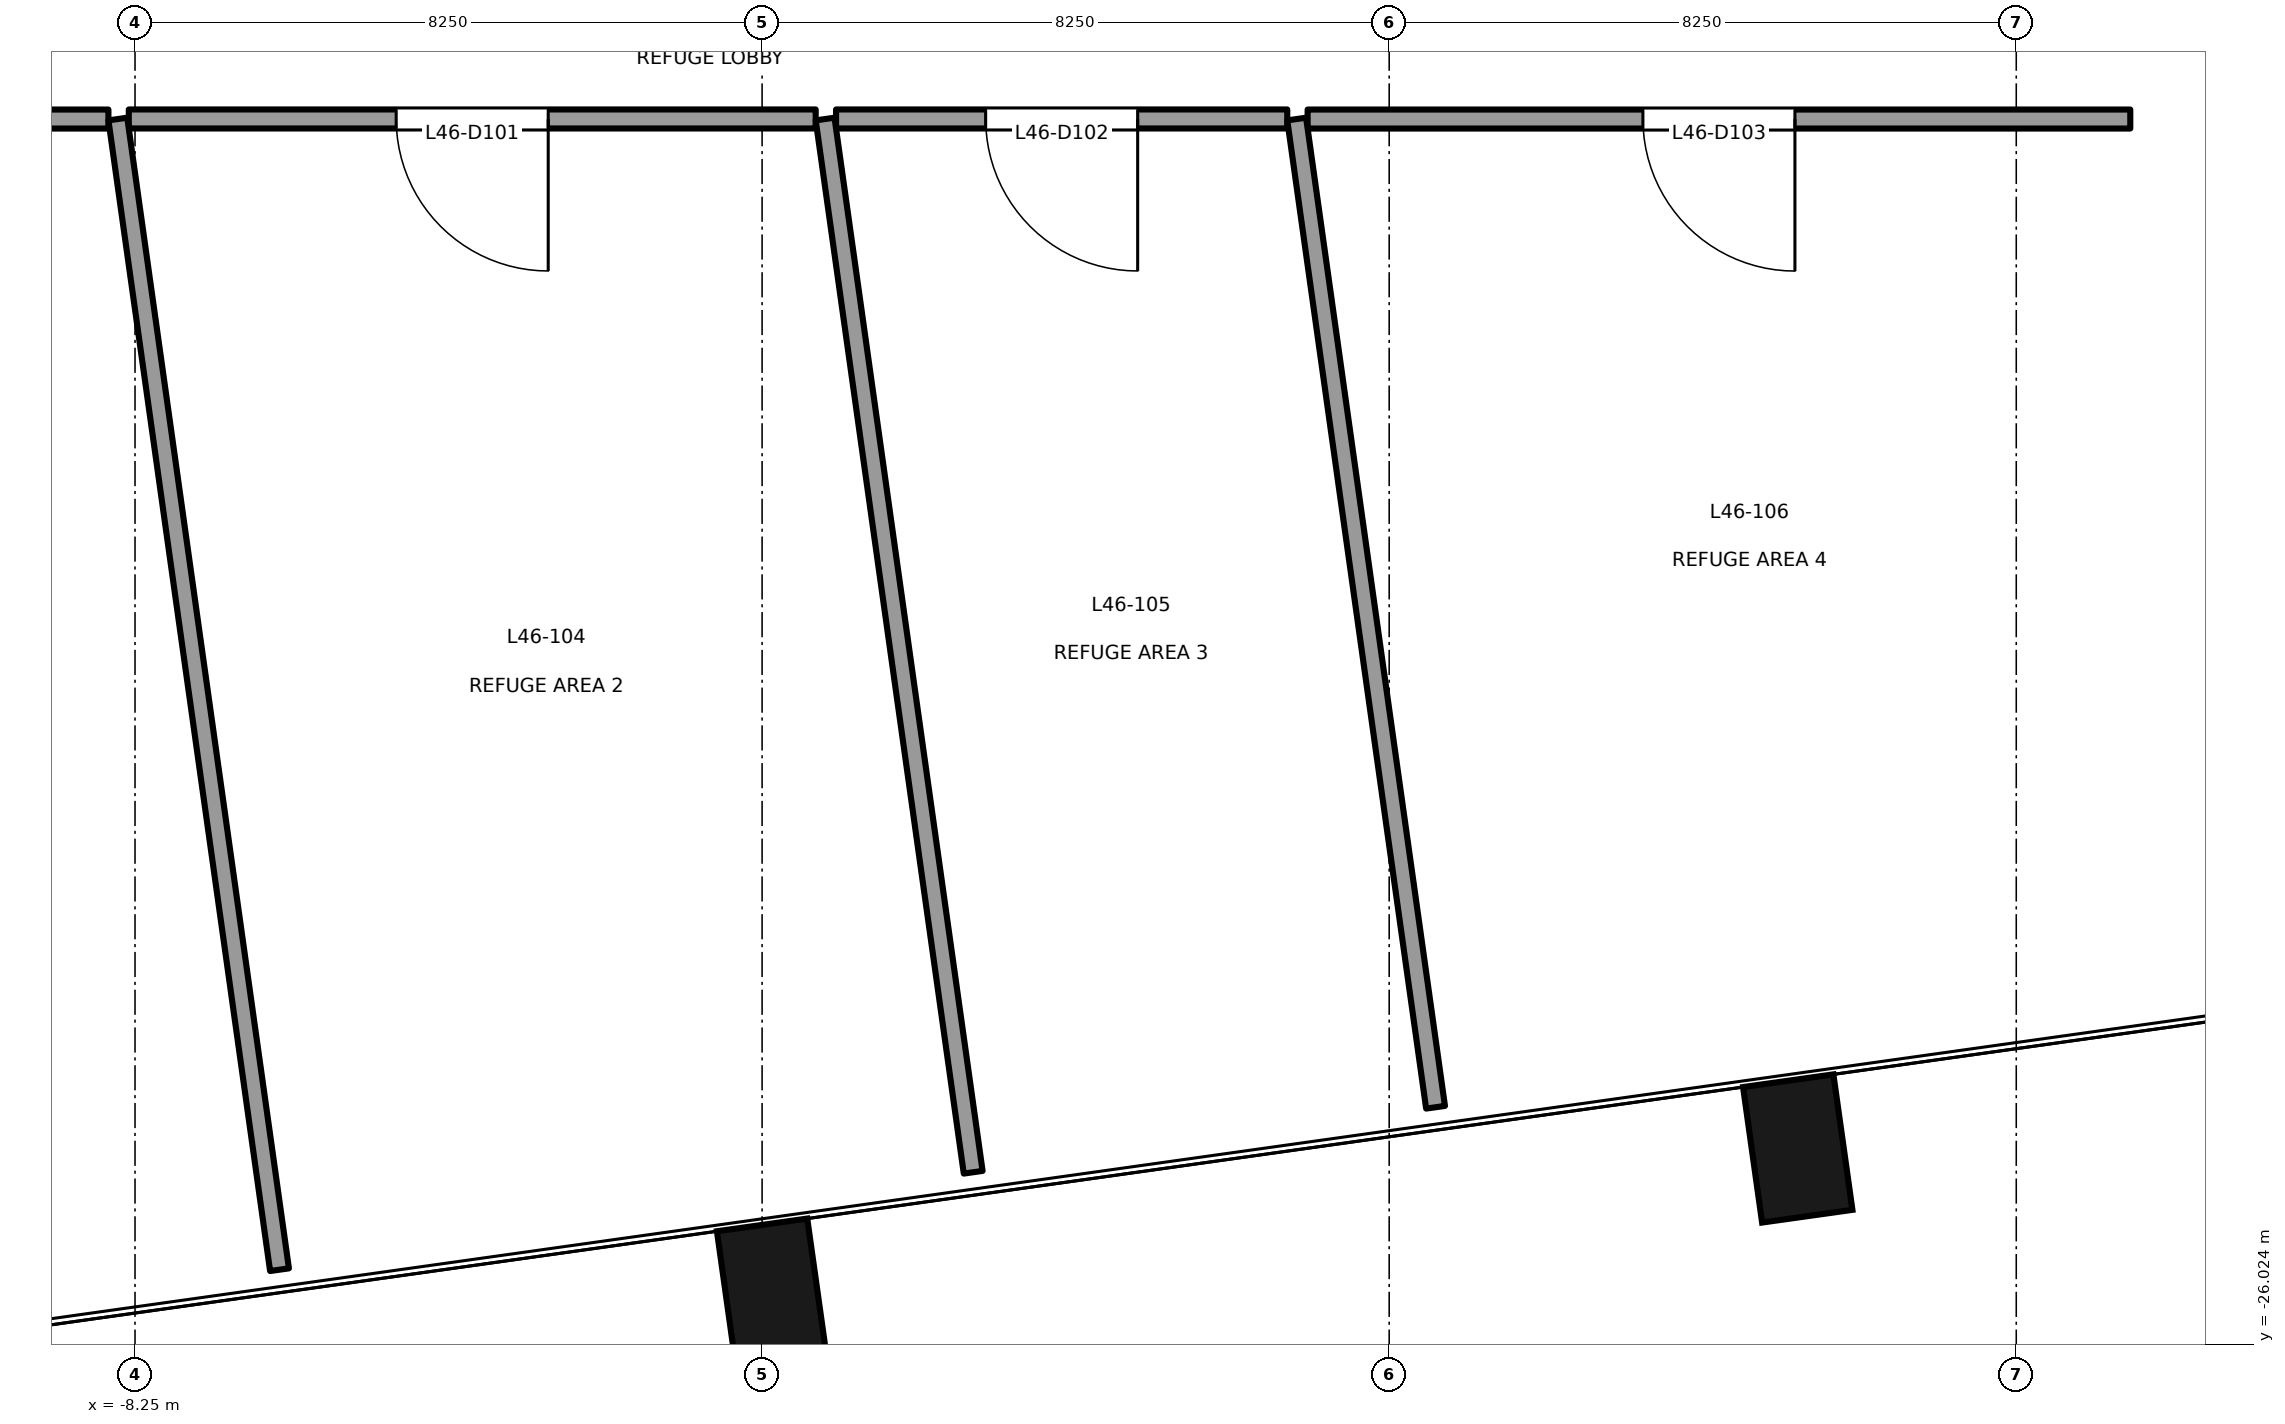
"""IFC4 building model, lengths in metres.
Left out: names, types, materials, properties, quantities, classifications, styles, units other than length and angle.
Written with IfcOpenShell. Run it as: python <this file> out.ifc"""

import sys

from ifc_helpers import new_model, si_unit, direction, frame, frame_2d, origin, origin_2d, place, context, subcontext, project, spatial, rectangle, extrude, element, fill, save


model = new_model("IFC4")
c1 = context("Model", 3, precision=1e-05, world=origin(), true_north=direction((0.0, 1.0)))
c2 = subcontext(c1, "Body", "Model", "MODEL_VIEW")
j1 = project(units=[si_unit("LENGTHUNIT", "METRE"), si_unit("PLANEANGLEUNIT", "RADIAN")], contexts=[c1])
p1 = place(None, origin())
s1 = spatial("IfcSite", under=j1, at=p1, CompositionType="ELEMENT")
p2 = place(p1, origin())
s2 = spatial("IfcBuilding", under=s1, at=p2, CompositionType="ELEMENT")
p3 = place(p2, frame((0.0, 0.0, 199.7)))
s3 = spatial("IfcBuildingStorey", under=s2, at=p3, CompositionType="ELEMENT", Elevation=199.7)
for number, where, z_axis, x_axis in (
    (1, (0.125, -25.34, -0.2), (0.0, 0.0, 1.0), (0.99, 0.139, 0.0)),
    (2, (13.625, -23.443, -0.2), (0.0, 0.0, 1.0), (0.99, 0.139, 0.0)),
):
    element("IfcColumn", number, at=place(p3, frame(where, z_axis=z_axis, x_axis=x_axis)), inside=s3, PredefinedType="COLUMN", context=c2, shape_type="SweptSolid", body=[
        extrude(rectangle(XDim=1.2, YDim=1.8, at=origin_2d()), origin(), (0.0, 0.0, 1.0), 8.4),
    ])
p4 = place(p3, frame((-8.6, -9.9, 0.0), z_axis=(0.0, 0.0, 1.0), x_axis=(-1.0, 0.0, 0.0)))
e3 = element("IfcWall", 3, at=p4, inside=s3, PredefinedType="PARTITIONING", context=c2, shape_type="SweptSolid", body=[
    extrude(rectangle(XDim=10.776, YDim=0.25, at=frame_2d((5.388, 0.0))), origin(), (0.0, 0.0, 1.0), 7.3),
])
p5 = place(p4, frame((4.388, 0.0, 0.0)))
e4 = element("IfcOpeningElement", 4, at=p5, cuts=e3, PredefinedType="OPENING", context=c2, shape_type="SweptSolid", body=[
    extrude(rectangle(XDim=2.0, YDim=2.1, at=frame_2d((1.0, 1.05))), frame((0.0, 0.135, 0.0), z_axis=(0.0, -1.0, 0.0), x_axis=(1.0, 0.0, 0.0)), (0.0, 0.0, 1.0), 0.271),
])
p6 = place(p3, frame((0.705, -9.899, 0.0), z_axis=(0.0, 0.0, 1.0), x_axis=(-1.0, 0.0, 0.0)))
e5 = element("IfcWall", 5, at=p6, inside=s3, PredefinedType="PARTITIONING", context=c2, shape_type="SweptSolid", body=[
    extrude(rectangle(XDim=9.037, YDim=0.25, at=frame_2d((4.519, 0.0))), origin(), (0.0, 0.0, 1.0), 7.3),
])
p7 = place(p6, frame((3.519, 0.0, 0.0)))
e6 = element("IfcOpeningElement", 6, at=p7, cuts=e5, PredefinedType="OPENING", context=c2, shape_type="SweptSolid", body=[
    extrude(rectangle(XDim=2.0, YDim=2.1, at=frame_2d((1.0, 1.05))), frame((0.0, 0.135, 0.0), z_axis=(0.0, -1.0, 0.0), x_axis=(1.0, 0.0, 0.0)), (0.0, 0.0, 1.0), 0.271),
])
p8 = place(p3, frame((6.909, -9.899, 0.0), z_axis=(0.0, 0.0, 1.0), x_axis=(-1.0, 0.0, 0.0)))
e7 = element("IfcWall", 7, at=p8, inside=s3, PredefinedType="PARTITIONING", context=c2, shape_type="SweptSolid", body=[
    extrude(rectangle(XDim=5.936, YDim=0.25, at=frame_2d((2.968, 0.0))), origin(), (0.0, 0.0, 1.0), 7.4),
])
p9 = place(p8, frame((1.968, 0.0, 0.0)))
e8 = element("IfcOpeningElement", 8, at=p9, cuts=e7, PredefinedType="OPENING", context=c2, shape_type="SweptSolid", body=[
    extrude(rectangle(XDim=2.0, YDim=2.1, at=frame_2d((1.0, 1.05))), frame((0.0, 0.135, 0.0), z_axis=(0.0, -1.0, 0.0), x_axis=(1.0, 0.0, 0.0)), (0.0, 0.0, 1.0), 0.271),
])
p10 = place(p3, frame((18.0, -9.9, 0.0), z_axis=(0.0, 0.0, 1.0), x_axis=(-1.0, 0.0, 0.0)))
e9 = element("IfcWall", 9, at=p10, inside=s3, PredefinedType="PARTITIONING", context=c2, shape_type="SweptSolid", body=[
    extrude(rectangle(XDim=10.823, YDim=0.25, at=frame_2d((5.412, 0.0))), origin(), (0.0, 0.0, 1.0), 7.4),
])
p11 = place(p10, frame((4.412, 0.0, 0.0)))
e10 = element("IfcOpeningElement", 10, at=p11, cuts=e9, PredefinedType="OPENING", context=c2, shape_type="SweptSolid", body=[
    extrude(rectangle(XDim=2.0, YDim=2.1, at=frame_2d((1.0, 1.05))), frame((0.0, 0.135, 0.0), z_axis=(0.0, -1.0, 0.0), x_axis=(1.0, 0.0, 0.0)), (0.0, 0.0, 1.0), 0.271),
])
p12 = place(p3, frame((-8.476, -9.9, 0.0), z_axis=(0.0, 0.0, 1.0), x_axis=(0.139135905406, -0.990273295523, 0.0)))
e11 = element("IfcWall", 11, at=p12, inside=s3, PredefinedType="PARTITIONING", context=c2, shape_type="SweptSolid", body=[
    extrude(rectangle(XDim=15.287, YDim=0.25, at=frame_2d((7.644, 0.0))), origin(), (0.0, 0.0, 1.0), 8.2),
])
p13 = place(p3, frame((0.829, -9.9, 0.0), z_axis=(0.0, 0.0, 1.0), x_axis=(0.139217671259, -0.990261803772, 0.0)))
e12 = element("IfcWall", 12, at=p13, inside=s3, PredefinedType="PARTITIONING", context=c2, shape_type="SweptSolid", body=[
    extrude(rectangle(XDim=13.992, YDim=0.25, at=frame_2d((6.996, 0.0))), origin(), (0.0, 0.0, 1.0), 8.2),
])
p14 = place(p3, frame((7.033, -9.9, 0.0), z_axis=(0.0, 0.0, 1.0), x_axis=(0.139171632447, -0.990268275127, 0.0)))
e13 = element("IfcWall", 13, at=p14, inside=s3, PredefinedType="PARTITIONING", context=c2, shape_type="SweptSolid", body=[
    extrude(rectangle(XDim=13.129, YDim=0.25, at=frame_2d((6.564, 0.0))), origin(), (0.0, 0.0, 1.0), 7.5),
])
p15 = place(p7, origin())
e14 = element("IfcDoor", 14, at=p15, inside=s3, OperationType="DOUBLE_DOOR_SINGLE_SWING", PredefinedType="DOOR", context=c2, shape_type="SweptSolid", body=[
    extrude(rectangle(XDim=2.0, YDim=2.1, at=frame_2d((1.0, 1.05))), frame((0.0, 0.025, 0.0), z_axis=(0.0, -1.0, 0.0), x_axis=(1.0, 0.0, 0.0)), (0.0, 0.0, 1.0), 0.05),
])
fill(e6, e14)
p16 = place(p9, origin())
e15 = element("IfcDoor", 15, at=p16, inside=s3, OperationType="DOUBLE_DOOR_SINGLE_SWING", PredefinedType="DOOR", context=c2, shape_type="SweptSolid", body=[
    extrude(rectangle(XDim=2.0, YDim=2.1, at=frame_2d((1.0, 1.05))), frame((0.0, 0.025, 0.0), z_axis=(0.0, -1.0, 0.0), x_axis=(1.0, 0.0, 0.0)), (0.0, 0.0, 1.0), 0.05),
])
fill(e8, e15)
p17 = place(p11, origin())
e16 = element("IfcDoor", 16, at=p17, inside=s3, OperationType="DOUBLE_DOOR_SINGLE_SWING", PredefinedType="DOOR", context=c2, shape_type="SweptSolid", body=[
    extrude(rectangle(XDim=2.0, YDim=2.1, at=frame_2d((1.0, 1.05))), frame((0.0, 0.025, 0.0), z_axis=(0.0, -1.0, 0.0), x_axis=(1.0, 0.0, 0.0)), (0.0, 0.0, 1.0), 0.05),
])
fill(e10, e16)
save(model, sys.argv[1])
